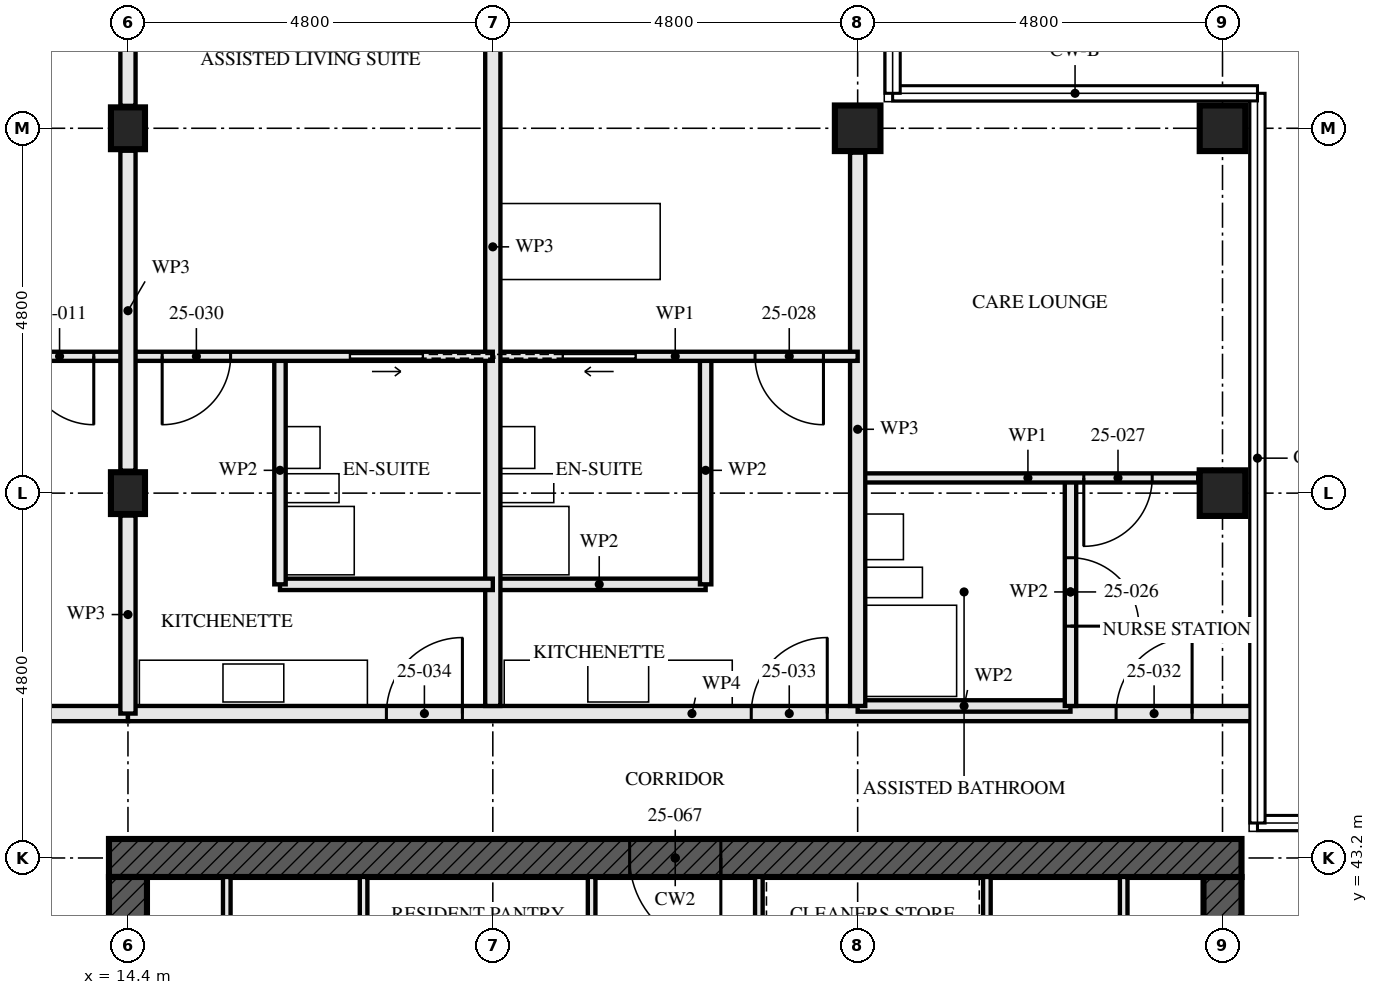
"""IFC4 building model, lengths in metres.
Left out: names, types, materials, properties, quantities, classifications, styles, units other than length and angle.
Written with IfcOpenShell. Run it as: python <this file> out.ifc"""

import sys

from ifc_helpers import new_model, si_unit, direction, frame, frame_2d, origin, origin_2d, place, context, subcontext, project, spatial, rectangle, hollow_rectangle, i_section, extrude, element, fill, save


model = new_model("IFC4")
c1 = context("Model", 3, precision=1e-05, world=origin(), true_north=direction((0.0, 1.0)))
c2 = subcontext(c1, "Body", "Model", "MODEL_VIEW")
j1 = project(units=[si_unit("LENGTHUNIT", "METRE"), si_unit("PLANEANGLEUNIT", "RADIAN")], contexts=[c1])
p1 = place(None, origin())
s1 = spatial("IfcSite", under=j1, at=p1, CompositionType="ELEMENT")
p2 = place(p1, origin())
s2 = spatial("IfcBuilding", under=s1, at=p2, CompositionType="ELEMENT")
p3 = place(p2, frame((0.0, 0.0, 94.5)))
s3 = spatial("IfcBuildingStorey", under=s2, at=p3, CompositionType="ELEMENT", Elevation=94.5)
for number, where, z_axis, x_axis in (
    (1, (14.4, 48.0, 0.0), (0.0, 0.0, 1.0), (1.0, 0.0, 0.0)),
    (2, (14.4, 52.8, 0.0), (0.0, 0.0, 1.0), (1.0, 0.0, 0.0)),
):
    element("IfcColumn", number, at=place(p3, frame(where, z_axis=z_axis, x_axis=x_axis)), inside=s3, PredefinedType="COLUMN", context=c2, shape_type="SweptSolid", body=[
        extrude(i_section(OverallWidth=0.448, OverallDepth=0.55, WebThickness=0.072, FlangeThickness=0.115, FilletRadius=0.015, at=origin_2d()), origin(), (0.0, 0.0, 1.0), 3.5),
    ])
p4 = place(p3, frame((24.0, 52.8, 0.0), z_axis=(0.0, 0.0, 1.0), x_axis=(0.0, 1.0, 0.0)))
e3 = element("IfcColumn", 3, at=p4, inside=s3, PredefinedType="COLUMN", context=c2, shape_type="SweptSolid", body=[
    extrude(hollow_rectangle(XDim=0.6, YDim=0.6, WallThickness=0.06, at=origin_2d()), origin(), (0.0, 0.0, 1.0), 3.5),
])
p5 = place(p3, frame((28.8, 48.0, 0.0), z_axis=(0.0, 0.0, 1.0), x_axis=(1.0, 0.0, 0.0)))
e4 = element("IfcColumn", 4, at=p5, inside=s3, PredefinedType="COLUMN", context=c2, shape_type="SweptSolid", body=[
    extrude(hollow_rectangle(XDim=0.6, YDim=0.6, WallThickness=0.08, at=origin_2d()), origin(), (0.0, 0.0, 1.0), 3.5),
])
p6 = place(p3, frame((28.8, 52.8, 0.0), z_axis=(0.0, 0.0, 1.0), x_axis=(0.0, 1.0, 0.0)))
e5 = element("IfcColumn", 5, at=p6, inside=s3, PredefinedType="COLUMN", context=c2, shape_type="SweptSolid", body=[
    extrude(hollow_rectangle(XDim=0.6, YDim=0.6, WallThickness=0.06, at=origin_2d()), origin(), (0.0, 0.0, 1.0), 3.5),
])
p7 = place(p3, frame((29.05, 43.2, -0.17), z_axis=(0.0, 0.0, 1.0), x_axis=(-1.0, 0.0, 0.0)))
e6 = element("IfcWall", 6, at=p7, inside=s3, PredefinedType="SHEAR", context=c2, shape_type="SweptSolid", body=[
    extrude(rectangle(XDim=14.9, YDim=0.5, at=frame_2d((7.45, 0.0))), origin(), (0.0, 0.0, 1.0), 3.5),
])
p8 = place(p7, frame((6.85, 0.0, 0.17)))
e7 = element("IfcOpeningElement", 7, at=p8, cuts=e6, PredefinedType="OPENING", context=c2, shape_type="SweptSolid", body=[
    extrude(rectangle(XDim=1.2, YDim=2.1, at=frame_2d((0.6, 1.05))), frame((0.0, 0.26, 0.0), z_axis=(0.0, -1.0, 0.0), x_axis=(1.0, 0.0, 0.0)), (0.0, 0.0, 1.0), 0.521),
])
p9 = place(p3, frame((14.4, 42.95, -0.17), z_axis=(0.0, 0.0, 1.0), x_axis=(0.0, -1.0, 0.0)))
e8 = element("IfcWall", 8, at=p9, inside=s3, PredefinedType="SHEAR", context=c2, shape_type="SweptSolid", body=[
    extrude(rectangle(XDim=13.9, YDim=0.5, at=frame_2d((6.95, 0.0))), origin(), (0.0, 0.0, 1.0), 3.5),
])
p10 = place(p9, frame((6.35, 0.0, 0.17)))
e9 = element("IfcOpeningElement", 9, at=p10, cuts=e8, PredefinedType="OPENING", context=c2, shape_type="SweptSolid", body=[
    extrude(rectangle(XDim=1.2, YDim=2.1, at=frame_2d((0.6, 1.05))), frame((0.0, 0.26, 0.0), z_axis=(0.0, -1.0, 0.0), x_axis=(1.0, 0.0, 0.0)), (0.0, 0.0, 1.0), 0.521),
])
p11 = place(p3, frame((28.8, 29.05, -0.17), z_axis=(0.0, 0.0, 1.0), x_axis=(0.0, 1.0, 0.0)))
e10 = element("IfcWall", 10, at=p11, inside=s3, PredefinedType="SHEAR", context=c2, shape_type="SweptSolid", body=[
    extrude(rectangle(XDim=13.9, YDim=0.5, at=frame_2d((6.95, 0.0))), origin(), (0.0, 0.0, 1.0), 3.5),
])
p12 = place(p11, frame((6.35, 0.0, 0.17)))
e11 = element("IfcOpeningElement", 11, at=p12, cuts=e10, PredefinedType="OPENING", context=c2, shape_type="SweptSolid", body=[
    extrude(rectangle(XDim=1.2, YDim=2.1, at=frame_2d((0.6, 1.05))), frame((0.0, 0.26, 0.0), z_axis=(0.0, -1.0, 0.0), x_axis=(1.0, 0.0, 0.0)), (0.0, 0.0, 1.0), 0.521),
])
p13 = place(p3, frame((14.4, 49.8, 0.0), z_axis=(0.0, 0.0, 1.0), x_axis=(-1.0, 0.0, 0.0)))
e12 = element("IfcWall", 12, at=p13, inside=s3, PredefinedType="PARTITIONING", context=c2, shape_type="SweptSolid", body=[
    extrude(rectangle(XDim=4.8, YDim=0.12, at=frame_2d((2.4, 0.0))), origin(), (0.0, 0.0, 1.0), 3.33),
])
p14 = place(p13, frame((0.45, 0.0, 0.0)))
e13 = element("IfcOpeningElement", 13, at=p14, cuts=e12, PredefinedType="OPENING", context=c2, shape_type="SweptSolid", body=[
    extrude(rectangle(XDim=0.9, YDim=2.1, at=frame_2d((0.45, 1.05))), frame((0.0, 0.071, 0.0), z_axis=(0.0, -1.0, 0.0), x_axis=(1.0, 0.0, 0.0)), (0.0, 0.0, 1.0), 0.141),
])
p15 = place(p3, frame((14.4, 45.1, 0.0), z_axis=(0.0, 0.0, 1.0), x_axis=(-1.0, 0.0, 0.0)))
e14 = element("IfcWall", 14, at=p15, inside=s3, PredefinedType="PARTITIONING", context=c2, shape_type="SweptSolid", body=[
    extrude(rectangle(XDim=9.6, YDim=0.2, at=frame_2d((4.8, 0.0))), origin(), (0.0, 0.0, 1.0), 3.33),
])
p16 = place(p15, frame((5.2, 0.0, 0.0)))
e15 = element("IfcOpeningElement", 15, at=p16, cuts=e14, PredefinedType="OPENING", context=c2, shape_type="SweptSolid", body=[
    extrude(rectangle(XDim=1.0, YDim=2.1, at=frame_2d((0.5, 1.05))), frame((0.0, 0.111, 0.0), z_axis=(0.0, -1.0, 0.0), x_axis=(1.0, 0.0, 0.0)), (0.0, 0.0, 1.0), 0.221),
])
p17 = place(p3, frame((26.8, 48.2, 0.0), z_axis=(0.0, 0.0, 1.0), x_axis=(0.0, -1.0, 0.0)))
e16 = element("IfcWall", 16, at=p17, inside=s3, PredefinedType="PARTITIONING", context=c2, shape_type="SweptSolid", body=[
    extrude(rectangle(XDim=3.0, YDim=0.15, at=frame_2d((1.5, 0.0))), origin(), (0.0, 0.0, 1.0), 2.55),
])
p18 = place(p17, frame((1.05, 0.0, 0.0)))
e17 = element("IfcOpeningElement", 17, at=p18, cuts=e16, PredefinedType="OPENING", context=c2, shape_type="SweptSolid", body=[
    extrude(rectangle(XDim=0.9, YDim=2.1, at=frame_2d((0.45, 1.05))), frame((0.0, 0.085, 0.0), z_axis=(0.0, -1.0, 0.0), x_axis=(1.0, 0.0, 0.0)), (0.0, 0.0, 1.0), 0.171),
])
p19 = place(p3, frame((26.8, 45.2, 0.0), z_axis=(0.0, 0.0, 1.0), x_axis=(-1.0, 0.0, 0.0)))
e18 = element("IfcWall", 18, at=p19, inside=s3, PredefinedType="PARTITIONING", context=c2, shape_type="SweptSolid", body=[
    extrude(rectangle(XDim=2.8, YDim=0.15, at=frame_2d((1.4, 0.0))), origin(), (0.0, 0.0, 1.0), 3.33),
])
p20 = place(p3, frame((28.48, 48.2, 0.0), z_axis=(0.0, 0.0, 1.0), x_axis=(-1.0, 0.0, 0.0)))
e19 = element("IfcWall", 19, at=p20, inside=s3, PredefinedType="PARTITIONING", context=c2, shape_type="SweptSolid", body=[
    extrude(rectangle(XDim=4.48, YDim=0.12, at=frame_2d((2.24, 0.0))), origin(), (0.0, 0.0, 1.0), 3.33),
])
p21 = place(p20, frame((0.605, 0.0, 0.0)))
e20 = element("IfcOpeningElement", 20, at=p21, cuts=e19, PredefinedType="OPENING", context=c2, shape_type="SweptSolid", body=[
    extrude(rectangle(XDim=0.9, YDim=2.1, at=frame_2d((0.45, 1.05))), frame((0.0, 0.071, 0.0), z_axis=(0.0, -1.0, 0.0), x_axis=(1.0, 0.0, 0.0)), (0.0, 0.0, 1.0), 0.141),
])
p22 = place(p3, frame((24.0, 52.48, 0.0), z_axis=(0.0, 0.0, 1.0), x_axis=(0.0, -1.0, 0.0)))
e21 = element("IfcWall", 21, at=p22, inside=s3, PredefinedType="PARTITIONING", context=c2, shape_type="SweptSolid", body=[
    extrude(rectangle(XDim=7.28, YDim=0.2, at=frame_2d((3.64, 0.0))), origin(), (0.0, 0.0, 1.0), 2.55),
])
p23 = place(p3, frame((22.0, 49.8, 0.0), z_axis=(0.0, 0.0, 1.0), x_axis=(0.0, -1.0, 0.0)))
e22 = element("IfcWall", 22, at=p23, inside=s3, PredefinedType="PARTITIONING", context=c2, shape_type="SweptSolid", body=[
    extrude(rectangle(XDim=3.0, YDim=0.15, at=frame_2d((1.5, 0.0))), origin(), (0.0, 0.0, 1.0), 2.55),
])
p24 = place(p3, frame((22.0, 46.8, 0.0), z_axis=(0.0, 0.0, 1.0), x_axis=(-1.0, 0.0, 0.0)))
e23 = element("IfcWall", 23, at=p24, inside=s3, PredefinedType="PARTITIONING", context=c2, shape_type="SweptSolid", body=[
    extrude(rectangle(XDim=2.8, YDim=0.15, at=frame_2d((1.4, 0.0))), origin(), (0.0, 0.0, 1.0), 3.33),
])
p25 = place(p3, frame((24.0, 49.8, 0.0), z_axis=(0.0, 0.0, 1.0), x_axis=(-1.0, 0.0, 0.0)))
e24 = element("IfcWall", 24, at=p25, inside=s3, PredefinedType="PARTITIONING", context=c2, shape_type="SweptSolid", body=[
    extrude(rectangle(XDim=4.8, YDim=0.12, at=frame_2d((2.4, 0.0))), origin(), (0.0, 0.0, 1.0), 3.33),
])
p26 = place(p25, frame((0.45, 0.0, 0.0)))
e25 = element("IfcOpeningElement", 25, at=p26, cuts=e24, PredefinedType="OPENING", context=c2, shape_type="SweptSolid", body=[
    extrude(rectangle(XDim=0.9, YDim=2.1, at=frame_2d((0.45, 1.05))), frame((0.0, 0.071, 0.0), z_axis=(0.0, -1.0, 0.0), x_axis=(1.0, 0.0, 0.0)), (0.0, 0.0, 1.0), 0.141),
])
p27 = place(p25, frame((2.925, 0.0, 0.0)))
e26 = element("IfcOpeningElement", 26, at=p27, cuts=e24, PredefinedType="OPENING", context=c2, shape_type="SweptSolid", body=[
    extrude(rectangle(XDim=0.95, YDim=2.1, at=frame_2d((0.475, 1.05))), frame((0.0, 0.071, 0.0), z_axis=(0.0, -1.0, 0.0), x_axis=(1.0, 0.0, 0.0)), (0.0, 0.0, 1.0), 0.141),
])
p28 = place(p3, frame((19.2, 57.28, 0.0), z_axis=(0.0, 0.0, 1.0), x_axis=(0.0, -1.0, 0.0)))
e27 = element("IfcWall", 27, at=p28, inside=s3, PredefinedType="PARTITIONING", context=c2, shape_type="SweptSolid", body=[
    extrude(rectangle(XDim=12.08, YDim=0.2, at=frame_2d((6.04, 0.0))), origin(), (0.0, 0.0, 1.0), 2.55),
])
p29 = place(p3, frame((16.4, 49.8, 0.0), z_axis=(0.0, 0.0, 1.0), x_axis=(0.0, -1.0, 0.0)))
e28 = element("IfcWall", 28, at=p29, inside=s3, PredefinedType="PARTITIONING", context=c2, shape_type="SweptSolid", body=[
    extrude(rectangle(XDim=3.0, YDim=0.15, at=frame_2d((1.5, 0.0))), origin(), (0.0, 0.0, 1.0), 2.55),
])
p30 = place(p3, frame((19.2, 46.8, 0.0), z_axis=(0.0, 0.0, 1.0), x_axis=(-1.0, 0.0, 0.0)))
e29 = element("IfcWall", 29, at=p30, inside=s3, PredefinedType="PARTITIONING", context=c2, shape_type="SweptSolid", body=[
    extrude(rectangle(XDim=2.8, YDim=0.15, at=frame_2d((1.4, 0.0))), origin(), (0.0, 0.0, 1.0), 3.33),
])
p31 = place(p3, frame((19.2, 49.8, 0.0), z_axis=(0.0, 0.0, 1.0), x_axis=(-1.0, 0.0, 0.0)))
e30 = element("IfcWall", 30, at=p31, inside=s3, PredefinedType="PARTITIONING", context=c2, shape_type="SweptSolid", body=[
    extrude(rectangle(XDim=4.8, YDim=0.12, at=frame_2d((2.4, 0.0))), origin(), (0.0, 0.0, 1.0), 3.33),
])
p32 = place(p31, frame((3.45, 0.0, 0.0)))
e31 = element("IfcOpeningElement", 31, at=p32, cuts=e30, PredefinedType="OPENING", context=c2, shape_type="SweptSolid", body=[
    extrude(rectangle(XDim=0.9, YDim=2.1, at=frame_2d((0.45, 1.05))), frame((0.0, 0.071, 0.0), z_axis=(0.0, -1.0, 0.0), x_axis=(1.0, 0.0, 0.0)), (0.0, 0.0, 1.0), 0.141),
])
p33 = place(p31, frame((0.925, 0.0, 0.0)))
e32 = element("IfcOpeningElement", 32, at=p33, cuts=e30, PredefinedType="OPENING", context=c2, shape_type="SweptSolid", body=[
    extrude(rectangle(XDim=0.95, YDim=2.1, at=frame_2d((0.475, 1.05))), frame((0.0, 0.071, 0.0), z_axis=(0.0, -1.0, 0.0), x_axis=(1.0, 0.0, 0.0)), (0.0, 0.0, 1.0), 0.141),
])
p34 = place(p3, frame((29.24, 45.1, 0.0), z_axis=(0.0, 0.0, 1.0), x_axis=(-1.0, 0.0, 0.0)))
e33 = element("IfcWall", 33, at=p34, inside=s3, PredefinedType="PARTITIONING", context=c2, shape_type="SweptSolid", body=[
    extrude(rectangle(XDim=14.84, YDim=0.2, at=frame_2d((7.42, 0.0))), origin(), (0.0, 0.0, 1.0), 2.32),
])
p35 = place(p34, frame((0.84, 0.0, 0.0)))
e34 = element("IfcOpeningElement", 34, at=p35, cuts=e33, PredefinedType="OPENING", context=c2, shape_type="SweptSolid", body=[
    extrude(rectangle(XDim=1.0, YDim=2.1, at=frame_2d((0.5, 1.05))), frame((0.0, 0.111, 0.0), z_axis=(0.0, -1.0, 0.0), x_axis=(1.0, 0.0, 0.0)), (0.0, 0.0, 1.0), 0.221),
])
p36 = place(p34, frame((5.64, 0.0, 0.0)))
e35 = element("IfcOpeningElement", 35, at=p36, cuts=e33, PredefinedType="OPENING", context=c2, shape_type="SweptSolid", body=[
    extrude(rectangle(XDim=1.0, YDim=2.1, at=frame_2d((0.5, 1.05))), frame((0.0, 0.111, 0.0), z_axis=(0.0, -1.0, 0.0), x_axis=(1.0, 0.0, 0.0)), (0.0, 0.0, 1.0), 0.221),
])
p37 = place(p34, frame((10.44, 0.0, 0.0)))
e36 = element("IfcOpeningElement", 36, at=p37, cuts=e33, PredefinedType="OPENING", context=c2, shape_type="SweptSolid", body=[
    extrude(rectangle(XDim=1.0, YDim=2.1, at=frame_2d((0.5, 1.05))), frame((0.0, 0.111, 0.0), z_axis=(0.0, -1.0, 0.0), x_axis=(1.0, 0.0, 0.0)), (0.0, 0.0, 1.0), 0.221),
])
for number, where, z_axis, x_axis in (
    (37, (15.7, 37.15, 0.0), (0.0, 0.0, 1.0), (0.0, 1.0, 0.0)),
    (38, (27.5, 37.15, 0.0), (0.0, 0.0, 1.0), (0.0, 1.0, 0.0)),
):
    element("IfcWall", number, at=place(p3, frame(where, z_axis=z_axis, x_axis=x_axis)), inside=s3, PredefinedType="SOLIDWALL", context=c2, shape_type="SweptSolid", body=[
        extrude(rectangle(XDim=5.8, YDim=0.1, at=frame_2d((2.9, 0.0))), origin(), (0.0, 0.0, 1.0), 3.33),
    ])
p38 = place(p3, frame((20.5, 37.15, 0.0), z_axis=(0.0, 0.0, 1.0), x_axis=(0.0, 1.0, 0.0)))
e39 = element("IfcWall", 39, at=p38, inside=s3, PredefinedType="SOLIDWALL", context=c2, shape_type="SweptSolid", body=[
    extrude(rectangle(XDim=5.8, YDim=0.1, at=frame_2d((2.9, 0.0))), origin(), (0.0, 0.0, 1.0), 3.33),
])
p39 = place(p38, frame((0.975, 0.0, 0.0)))
e40 = element("IfcOpeningElement", 40, at=p39, cuts=e39, PredefinedType="OPENING", context=c2, shape_type="SweptSolid", body=[
    extrude(rectangle(XDim=0.9, YDim=2.1, at=frame_2d((0.45, 1.05))), frame((0.0, 0.061, 0.0), z_axis=(0.0, -1.0, 0.0), x_axis=(1.0, 0.0, 0.0)), (0.0, 0.0, 1.0), 0.121),
])
p40 = place(p3, frame((22.7, 37.15, 0.0), z_axis=(0.0, 0.0, 1.0), x_axis=(0.0, 1.0, 0.0)))
e41 = element("IfcWall", 41, at=p40, inside=s3, PredefinedType="SOLIDWALL", context=c2, shape_type="SweptSolid", body=[
    extrude(rectangle(XDim=5.8, YDim=0.1, at=frame_2d((2.9, 0.0))), origin(), (0.0, 0.0, 1.0), 3.33),
])
p41 = place(p40, frame((0.925, 0.0, 0.0)))
e42 = element("IfcOpeningElement", 42, at=p41, cuts=e41, PredefinedType="OPENING", context=c2, shape_type="SweptSolid", body=[
    extrude(rectangle(XDim=1.0, YDim=2.1, at=frame_2d((0.5, 1.05))), frame((0.0, 0.061, 0.0), z_axis=(0.0, -1.0, 0.0), x_axis=(1.0, 0.0, 0.0)), (0.0, 0.0, 1.0), 0.121),
])
p42 = place(p40, frame((3.9, 0.0, 0.0)))
e43 = element("IfcOpeningElement", 43, at=p42, cuts=e41, PredefinedType="OPENING", context=c2, shape_type="SweptSolid", body=[
    extrude(rectangle(XDim=1.0, YDim=2.1, at=frame_2d((0.5, 1.05))), frame((0.0, 0.061, 0.0), z_axis=(0.0, -1.0, 0.0), x_axis=(1.0, 0.0, 0.0)), (0.0, 0.0, 1.0), 0.121),
])
for number, where, z_axis, x_axis in (
    (44, (17.5, 37.15, 0.0), (0.0, 0.0, 1.0), (0.0, 1.0, 0.0)),
    (45, (25.7, 37.15, 0.0), (0.0, 0.0, 1.0), (0.0, 1.0, 0.0)),
):
    element("IfcWall", number, at=place(p3, frame(where, z_axis=z_axis, x_axis=x_axis)), inside=s3, PredefinedType="SOLIDWALL", context=c2, shape_type="SweptSolid", body=[
        extrude(rectangle(XDim=5.8, YDim=0.1, at=frame_2d((2.9, 0.0))), origin(), (0.0, 0.0, 1.0), 3.33),
    ])
p43 = place(p3, frame((14.4, 45.1, 0.0), z_axis=(0.0, 0.0, 1.0), x_axis=(0.0, 1.0, 0.0)))
e46 = element("IfcWall", 46, at=p43, inside=s3, PredefinedType="PARTITIONING", context=c2, shape_type="SweptSolid", body=[
    extrude(rectangle(XDim=2.605, YDim=0.2, at=frame_2d((1.302, 0.0))), origin(), (0.0, 0.0, 1.0), 2.32),
])
p44 = place(p3, frame((14.4, 48.295, 0.0), z_axis=(0.0, 0.0, 1.0), x_axis=(0.0, 1.0, 0.0)))
e47 = element("IfcWall", 47, at=p44, inside=s3, PredefinedType="PARTITIONING", context=c2, shape_type="SweptSolid", body=[
    extrude(rectangle(XDim=4.21, YDim=0.2, at=frame_2d((2.105, 0.0))), origin(), (0.0, 0.0, 1.0), 2.32),
])
p45 = place(p3, frame((14.4, 53.095, 0.0), z_axis=(0.0, 0.0, 1.0), x_axis=(0.0, 1.0, 0.0)))
e48 = element("IfcWall", 48, at=p45, inside=s3, PredefinedType="PARTITIONING", context=c2, shape_type="SweptSolid", body=[
    extrude(rectangle(XDim=4.258, YDim=0.2, at=frame_2d((2.129, 0.0))), origin(), (0.0, 0.0, 1.0), 2.32),
])
p46 = place(p14, origin())
e49 = element("IfcDoor", 49, at=p46, inside=s3, OperationType="SINGLE_SWING_RIGHT", PredefinedType="DOOR", context=c2, shape_type="SweptSolid", body=[
    extrude(rectangle(XDim=0.9, YDim=2.1, at=frame_2d((0.45, 1.05))), frame((0.0, 0.022, 0.0), z_axis=(0.0, -1.0, 0.0), x_axis=(1.0, 0.0, 0.0)), (0.0, 0.0, 1.0), 0.044),
])
fill(e13, e49)
p47 = place(p18, origin())
e50 = element("IfcDoor", 50, at=p47, inside=s3, OperationType="SINGLE_SWING_LEFT", PredefinedType="DOOR", context=c2, shape_type="SweptSolid", body=[
    extrude(rectangle(XDim=0.9, YDim=2.1, at=frame_2d((0.45, 1.05))), frame((0.0, 0.022, 0.0), z_axis=(0.0, -1.0, 0.0), x_axis=(1.0, 0.0, 0.0)), (0.0, 0.0, 1.0), 0.044),
])
fill(e17, e50)
p48 = place(p21, origin())
e51 = element("IfcDoor", 51, at=p48, inside=s3, OperationType="SINGLE_SWING_LEFT", PredefinedType="DOOR", context=c2, shape_type="SweptSolid", body=[
    extrude(rectangle(XDim=0.9, YDim=2.1, at=frame_2d((0.45, 1.05))), frame((0.0, 0.022, 0.0), z_axis=(0.0, -1.0, 0.0), x_axis=(1.0, 0.0, 0.0)), (0.0, 0.0, 1.0), 0.044),
])
fill(e20, e51)
p49 = place(p26, origin())
e52 = element("IfcDoor", 52, at=p49, inside=s3, OperationType="SINGLE_SWING_RIGHT", PredefinedType="DOOR", context=c2, shape_type="SweptSolid", body=[
    extrude(rectangle(XDim=0.9, YDim=2.1, at=frame_2d((0.45, 1.05))), frame((0.0, 0.022, 0.0), z_axis=(0.0, -1.0, 0.0), x_axis=(1.0, 0.0, 0.0)), (0.0, 0.0, 1.0), 0.044),
])
fill(e25, e52)
p50 = place(p27, origin())
e53 = element("IfcDoor", 53, at=p50, inside=s3, OperationType="SLIDING_TO_LEFT", PredefinedType="DOOR", context=c2, shape_type="SweptSolid", body=[
    extrude(rectangle(XDim=0.95, YDim=2.1, at=frame_2d((0.475, 1.05))), frame((0.0, 0.022, 0.0), z_axis=(0.0, -1.0, 0.0), x_axis=(1.0, 0.0, 0.0)), (0.0, 0.0, 1.0), 0.044),
])
fill(e26, e53)
p51 = place(p32, origin())
e54 = element("IfcDoor", 54, at=p51, inside=s3, OperationType="SINGLE_SWING_LEFT", PredefinedType="DOOR", context=c2, shape_type="SweptSolid", body=[
    extrude(rectangle(XDim=0.9, YDim=2.1, at=frame_2d((0.45, 1.05))), frame((0.0, 0.022, 0.0), z_axis=(0.0, -1.0, 0.0), x_axis=(1.0, 0.0, 0.0)), (0.0, 0.0, 1.0), 0.044),
])
fill(e31, e54)
p52 = place(p33, origin())
e55 = element("IfcDoor", 55, at=p52, inside=s3, OperationType="SLIDING_TO_RIGHT", PredefinedType="DOOR", context=c2, shape_type="SweptSolid", body=[
    extrude(rectangle(XDim=0.95, YDim=2.1, at=frame_2d((0.475, 1.05))), frame((0.0, 0.022, 0.0), z_axis=(0.0, -1.0, 0.0), x_axis=(1.0, 0.0, 0.0)), (0.0, 0.0, 1.0), 0.044),
])
fill(e32, e55)
p53 = place(p35, frame((1.0, 0.0, 0.0), z_axis=(0.0, 0.0, 1.0), x_axis=(-1.0, 0.0, 0.0)))
e56 = element("IfcDoor", 56, at=p53, inside=s3, OperationType="SINGLE_SWING_LEFT", PredefinedType="DOOR", context=c2, shape_type="SweptSolid", body=[
    extrude(rectangle(XDim=1.0, YDim=2.1, at=frame_2d((0.5, 1.05))), frame((0.0, 0.027, 0.0), z_axis=(0.0, -1.0, 0.0), x_axis=(1.0, 0.0, 0.0)), (0.0, 0.0, 1.0), 0.054),
])
fill(e34, e56)
p54 = place(p36, frame((1.0, 0.0, 0.0), z_axis=(0.0, 0.0, 1.0), x_axis=(-1.0, 0.0, 0.0)))
e57 = element("IfcDoor", 57, at=p54, inside=s3, OperationType="SINGLE_SWING_LEFT", PredefinedType="DOOR", context=c2, shape_type="SweptSolid", body=[
    extrude(rectangle(XDim=1.0, YDim=2.1, at=frame_2d((0.5, 1.05))), frame((0.0, 0.027, 0.0), z_axis=(0.0, -1.0, 0.0), x_axis=(1.0, 0.0, 0.0)), (0.0, 0.0, 1.0), 0.054),
])
fill(e35, e57)
p55 = place(p37, frame((1.0, 0.0, 0.0), z_axis=(0.0, 0.0, 1.0), x_axis=(-1.0, 0.0, 0.0)))
e58 = element("IfcDoor", 58, at=p55, inside=s3, OperationType="SINGLE_SWING_LEFT", PredefinedType="DOOR", context=c2, shape_type="SweptSolid", body=[
    extrude(rectangle(XDim=1.0, YDim=2.1, at=frame_2d((0.5, 1.05))), frame((0.0, 0.027, 0.0), z_axis=(0.0, -1.0, 0.0), x_axis=(1.0, 0.0, 0.0)), (0.0, 0.0, 1.0), 0.054),
])
fill(e36, e58)
p56 = place(p8, origin())
e59 = element("IfcDoor", 59, at=p56, inside=s3, OperationType="SINGLE_SWING_LEFT", PredefinedType="DOOR", context=c2, shape_type="SweptSolid", body=[
    extrude(rectangle(XDim=1.2, YDim=2.1, at=frame_2d((0.6, 1.05))), frame((0.0, 0.027, 0.0), z_axis=(0.0, -1.0, 0.0), x_axis=(1.0, 0.0, 0.0)), (0.0, 0.0, 1.0), 0.054),
])
fill(e7, e59)
save(model, sys.argv[1])
